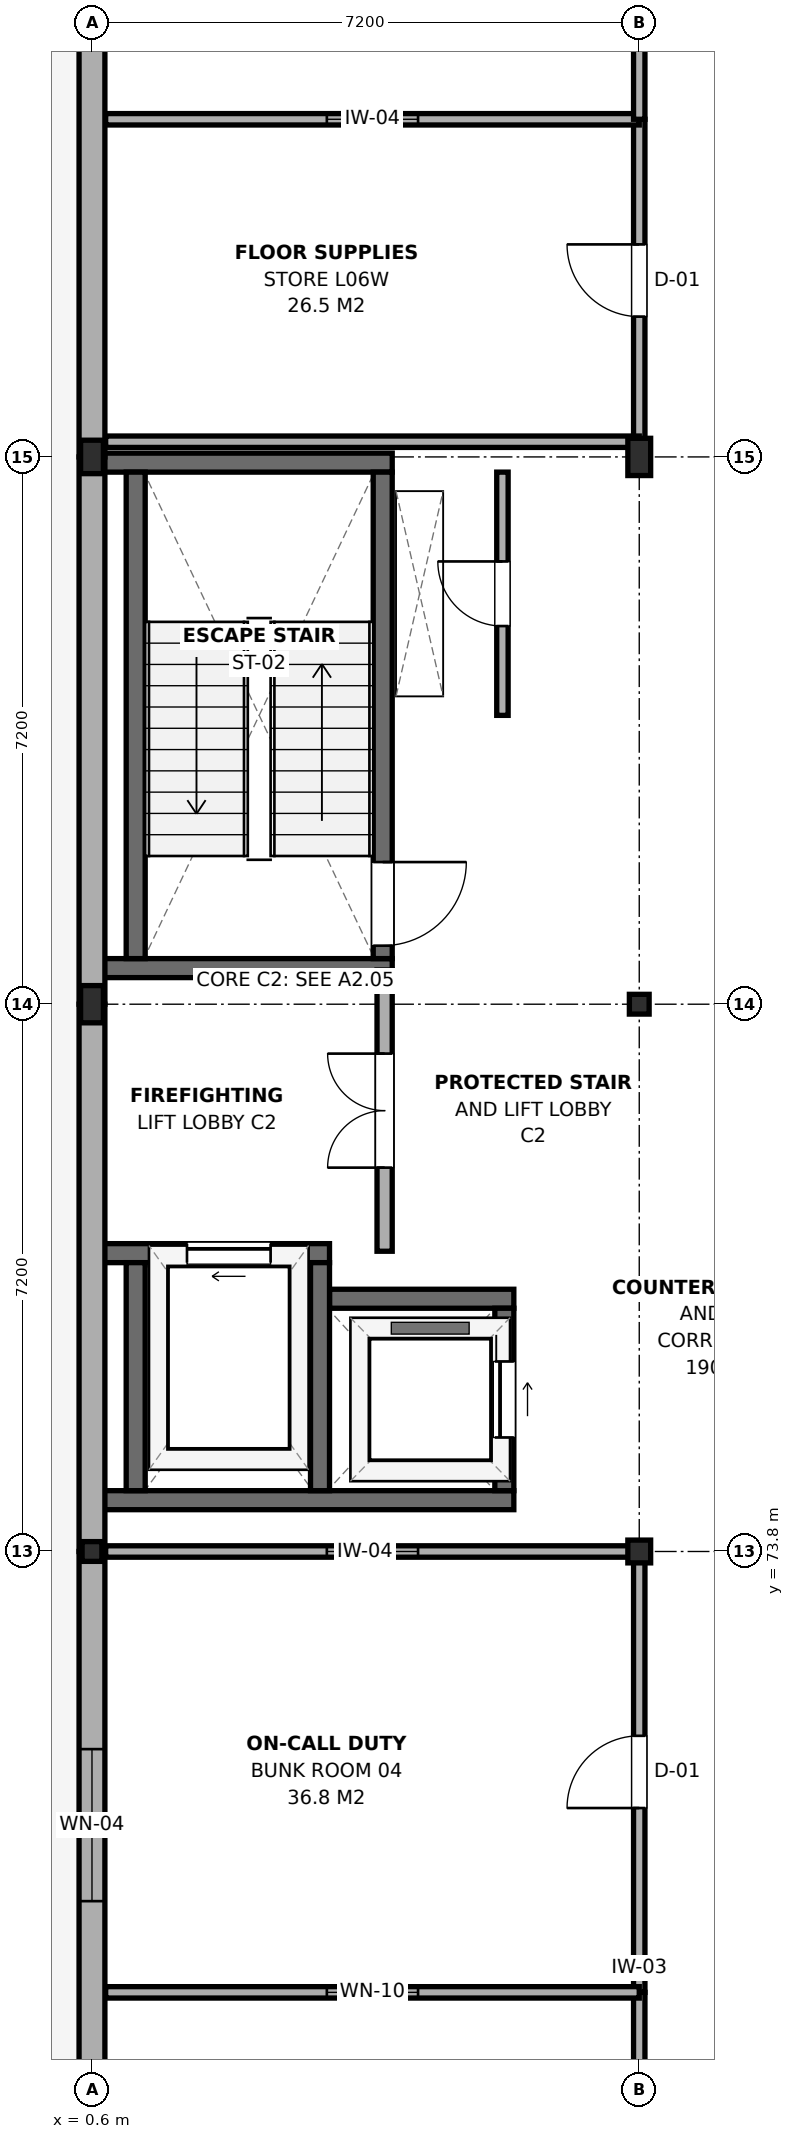
"""IFC4 building model, lengths in metres.
Left out: names, types, materials, properties, quantities, classifications, styles, units other than length and angle.
Written with IfcOpenShell. Run it as: python <this file> out.ifc"""

import sys

from ifc_helpers import new_model, si_unit, direction, frame, frame_2d, origin, origin_2d, place, context, subcontext, project, spatial, rectangle, i_section, extrude, element, fill, save


model = new_model("IFC4")
c1 = context("Model", 3, precision=1e-05, world=origin(), true_north=direction((0.0, 1.0)))
c2 = subcontext(c1, "Body", "Model", "MODEL_VIEW")
j1 = project(units=[si_unit("LENGTHUNIT", "METRE"), si_unit("PLANEANGLEUNIT", "RADIAN")], contexts=[c1])
p1 = place(None, origin())
s1 = spatial("IfcSite", under=j1, at=p1, CompositionType="ELEMENT")
p2 = place(p1, origin())
s2 = spatial("IfcBuilding", under=s1, at=p2, CompositionType="ELEMENT")
p3 = place(p2, frame((0.0, 0.0, 24.9)))
s3 = spatial("IfcBuildingStorey", under=s2, at=p3, CompositionType="ELEMENT", Elevation=24.9)
p4 = place(p3, frame((0.6, 73.8, 0.0), z_axis=(0.0, 0.0, 1.0), x_axis=(1.0, 0.0, 0.0)))
e1 = element("IfcColumn", 1, at=p4, inside=s3, PredefinedType="COLUMN", context=c2, shape_type="SweptSolid", body=[
    extrude(i_section(OverallWidth=0.26, OverallDepth=0.26, WebThickness=0.01, FlangeThickness=0.018, FilletRadius=0.024, at=origin_2d()), origin(), (0.0, 0.0, 1.0), 3.9),
])
p5 = place(p3, frame((0.6, 81.0, 0.0), z_axis=(0.0, 0.0, 1.0), x_axis=(1.0, 0.0, 0.0)))
e2 = element("IfcColumn", 2, at=p5, inside=s3, PredefinedType="COLUMN", context=c2, shape_type="SweptSolid", body=[
    extrude(i_section(OverallWidth=0.3, OverallDepth=0.49, WebThickness=0.012, FlangeThickness=0.023, FilletRadius=0.027, at=origin_2d()), origin(), (0.0, 0.0, 1.0), 3.9),
])
p6 = place(p3, frame((0.6, 88.2, 0.0), z_axis=(0.0, 0.0, 1.0), x_axis=(1.0, 0.0, 0.0)))
e3 = element("IfcColumn", 3, at=p6, inside=s3, PredefinedType="COLUMN", context=c2, shape_type="SweptSolid", body=[
    extrude(i_section(OverallWidth=0.3, OverallDepth=0.44, WebThickness=0.011, FlangeThickness=0.021, FilletRadius=0.027, at=origin_2d()), origin(), (0.0, 0.0, 1.0), 3.9),
])
p7 = place(p3, frame((7.8, 73.8, 0.0), z_axis=(0.0, 0.0, 1.0), x_axis=(1.0, 0.0, 0.0)))
e4 = element("IfcColumn", 4, at=p7, inside=s3, PredefinedType="COLUMN", context=c2, shape_type="SweptSolid", body=[
    extrude(i_section(OverallWidth=0.3, OverallDepth=0.3, WebThickness=0.011, FlangeThickness=0.019, FilletRadius=0.027, at=origin_2d()), origin(), (0.0, 0.0, 1.0), 3.9),
])
p8 = place(p3, frame((7.8, 81.0, 0.0), z_axis=(0.0, 0.0, 1.0), x_axis=(1.0, 0.0, 0.0)))
e5 = element("IfcColumn", 5, at=p8, inside=s3, PredefinedType="COLUMN", context=c2, shape_type="SweptSolid", body=[
    extrude(i_section(OverallWidth=0.26, OverallDepth=0.26, WebThickness=0.01, FlangeThickness=0.018, FilletRadius=0.024, at=origin_2d()), origin(), (0.0, 0.0, 1.0), 3.9),
])
p9 = place(p3, frame((7.8, 88.2, 0.0), z_axis=(0.0, 0.0, 1.0), x_axis=(1.0, 0.0, 0.0)))
e6 = element("IfcColumn", 6, at=p9, inside=s3, PredefinedType="COLUMN", context=c2, shape_type="SweptSolid", body=[
    extrude(i_section(OverallWidth=0.3, OverallDepth=0.49, WebThickness=0.012, FlangeThickness=0.023, FilletRadius=0.027, at=origin_2d()), origin(), (0.0, 0.0, 1.0), 3.9),
])
for number, where, z_axis, x_axis in (
    (7, (0.75, 81.475, 0.0), (0.0, 0.0, 1.0), (1.0, 0.0, 0.0)),
    (8, (0.75, 88.125, 0.0), (0.0, 0.0, 1.0), (1.0, 0.0, 0.0)),
):
    element("IfcWall", number, at=place(p3, frame(where, z_axis=z_axis, x_axis=x_axis)), inside=s3, PredefinedType="SHEAR", context=c2, shape_type="SweptSolid", body=[
        extrude(rectangle(XDim=3.8, YDim=0.25, at=frame_2d((1.9, 0.0))), origin(), (0.0, 0.0, 1.0), 3.72),
    ])
p10 = place(p3, frame((1.175, 81.6, 0.0), z_axis=(0.0, 0.0, 1.0), x_axis=(0.0, 1.0, 0.0)))
e9 = element("IfcWall", 9, at=p10, inside=s3, PredefinedType="SHEAR", context=c2, shape_type="SweptSolid", body=[
    extrude(rectangle(XDim=6.4, YDim=0.25, at=frame_2d((3.2, 0.0))), origin(), (0.0, 0.0, 1.0), 3.72),
])
p11 = place(p3, frame((4.425, 81.6, 0.0), z_axis=(0.0, 0.0, 1.0), x_axis=(0.0, 1.0, 0.0)))
e10 = element("IfcWall", 10, at=p11, inside=s3, PredefinedType="SHEAR", context=c2, shape_type="SweptSolid", body=[
    extrude(rectangle(XDim=6.4, YDim=0.25, at=frame_2d((3.2, 0.0))), origin(), (0.0, 0.0, 1.0), 3.72),
])
p12 = place(p11, frame((0.17, 0.0, 0.0)))
e11 = element("IfcOpeningElement", 11, at=p12, cuts=e10, PredefinedType="OPENING", context=c2, shape_type="SweptSolid", body=[
    extrude(rectangle(XDim=1.1, YDim=2.15, at=frame_2d((0.55, 1.075))), frame((0.0, 0.14, 0.0), z_axis=(0.0, -1.0, 0.0), x_axis=(1.0, 0.0, 0.0)), (0.0, 0.0, 1.0), 0.28),
])
p13 = place(p3, frame((0.75, 74.475, 0.0), z_axis=(0.0, 0.0, 1.0), x_axis=(1.0, 0.0, 0.0)))
e12 = element("IfcWall", 12, at=p13, inside=s3, PredefinedType="SHEAR", context=c2, shape_type="SweptSolid", body=[
    extrude(rectangle(XDim=5.4, YDim=0.25, at=frame_2d((2.7, 0.0))), origin(), (0.0, 0.0, 1.0), 3.72),
])
p14 = place(p3, frame((0.75, 77.725, 0.0), z_axis=(0.0, 0.0, 1.0), x_axis=(1.0, 0.0, 0.0)))
e13 = element("IfcWall", 13, at=p14, inside=s3, PredefinedType="SHEAR", context=c2, shape_type="SweptSolid", body=[
    extrude(rectangle(XDim=2.975, YDim=0.25, at=frame_2d((1.488, 0.0))), origin(), (0.0, 0.0, 1.0), 3.72),
])
p15 = place(p14, frame((1.1, 0.0, 0.0)))
e14 = element("IfcOpeningElement", 14, at=p15, cuts=e13, PredefinedType="OPENING", context=c2, shape_type="SweptSolid", body=[
    extrude(rectangle(XDim=1.1, YDim=2.15, at=frame_2d((0.55, 1.075))), frame((0.0, 0.14, 0.0), z_axis=(0.0, -1.0, 0.0), x_axis=(1.0, 0.0, 0.0)), (0.0, 0.0, 1.0), 0.28),
])
p16 = place(p3, frame((3.725, 77.125, 0.0), z_axis=(0.0, 0.0, 1.0), x_axis=(1.0, 0.0, 0.0)))
e15 = element("IfcWall", 15, at=p16, inside=s3, PredefinedType="SHEAR", context=c2, shape_type="SweptSolid", body=[
    extrude(rectangle(XDim=2.425, YDim=0.25, at=frame_2d((1.212, 0.0))), origin(), (0.0, 0.0, 1.0), 3.72),
])
for number, where, z_axis, x_axis in (
    (16, (1.175, 74.6, 0.0), (0.0, 0.0, 1.0), (0.0, 1.0, 0.0)),
    (17, (3.6, 74.6, 0.0), (0.0, 0.0, 1.0), (0.0, 1.0, 0.0)),
):
    element("IfcWall", number, at=place(p3, frame(where, z_axis=z_axis, x_axis=x_axis)), inside=s3, PredefinedType="SHEAR", context=c2, shape_type="SweptSolid", body=[
        extrude(rectangle(XDim=3.0, YDim=0.25, at=frame_2d((1.5, 0.0))), origin(), (0.0, 0.0, 1.0), 3.72),
    ])
p17 = place(p3, frame((6.025, 74.6, 0.0), z_axis=(0.0, 0.0, 1.0), x_axis=(0.0, 1.0, 0.0)))
e18 = element("IfcWall", 18, at=p17, inside=s3, PredefinedType="SHEAR", context=c2, shape_type="SweptSolid", body=[
    extrude(rectangle(XDim=2.4, YDim=0.25, at=frame_2d((1.2, 0.0))), origin(), (0.0, 0.0, 1.0), 3.72),
])
p18 = place(p17, frame((0.7, 0.0, 0.0)))
e19 = element("IfcOpeningElement", 19, at=p18, cuts=e18, PredefinedType="OPENING", context=c2, shape_type="SweptSolid", body=[
    extrude(rectangle(XDim=1.0, YDim=2.15, at=frame_2d((0.5, 1.075))), frame((0.0, 0.14, 0.0), z_axis=(0.0, -1.0, 0.0), x_axis=(1.0, 0.0, 0.0)), (0.0, 0.0, 1.0), 0.28),
])
p19 = place(p3, frame((0.6, 66.6, 0.0), z_axis=(0.0, 0.0, 1.0), x_axis=(0.0, 1.0, 0.0)))
e20 = element("IfcWall", 20, at=p19, inside=s3, PredefinedType="SOLIDWALL", context=c2, shape_type="SweptSolid", body=[
    extrude(rectangle(XDim=7.2, YDim=0.34, at=frame_2d((3.6, 0.0))), origin(), (0.0, 0.0, 1.0), 3.165),
])
p20 = place(p19, frame((2.6, 0.0, 0.9)))
e21 = element("IfcOpeningElement", 21, at=p20, cuts=e20, PredefinedType="OPENING", context=c2, shape_type="SweptSolid", body=[
    extrude(rectangle(XDim=2.0, YDim=1.8, at=frame_2d((1.0, 0.9))), frame((0.0, 0.185, 0.0), z_axis=(0.0, -1.0, 0.0), x_axis=(1.0, 0.0, 0.0)), (0.0, 0.0, 1.0), 0.37),
])
p21 = place(p3, frame((0.6, 73.8, 0.0), z_axis=(0.0, 0.0, 1.0), x_axis=(0.0, 1.0, 0.0)))
e22 = element("IfcWall", 22, at=p21, inside=s3, PredefinedType="SOLIDWALL", context=c2, shape_type="SweptSolid", body=[
    extrude(rectangle(XDim=7.2, YDim=0.34, at=frame_2d((3.6, 0.0))), origin(), (0.0, 0.0, 1.0), 3.215),
])
p22 = place(p3, frame((0.6, 81.0, 0.0), z_axis=(0.0, 0.0, 1.0), x_axis=(0.0, 1.0, 0.0)))
e23 = element("IfcWall", 23, at=p22, inside=s3, PredefinedType="SOLIDWALL", context=c2, shape_type="SweptSolid", body=[
    extrude(rectangle(XDim=7.2, YDim=0.34, at=frame_2d((3.6, 0.0))), origin(), (0.0, 0.0, 1.0), 3.265),
])
p23 = place(p3, frame((0.6, 88.2, 0.0), z_axis=(0.0, 0.0, 1.0), x_axis=(0.0, 1.0, 0.0)))
e24 = element("IfcWall", 24, at=p23, inside=s3, PredefinedType="SOLIDWALL", context=c2, shape_type="SweptSolid", body=[
    extrude(rectangle(XDim=7.8, YDim=0.34, at=frame_2d((3.9, 0.0))), origin(), (0.0, 0.0, 1.0), 3.225),
])
p24 = place(p3, frame((4.45, 77.75, 0.0), z_axis=(0.0, 0.0, 1.0), x_axis=(0.0, 1.0, 0.0)))
e25 = element("IfcWall", 25, at=p24, inside=s3, PredefinedType="PARTITIONING", context=c2, shape_type="SweptSolid", body=[
    extrude(rectangle(XDim=3.7, YDim=0.2, at=frame_2d((1.85, 0.0))), origin(), (0.0, 0.0, 1.0), 3.115),
])
p25 = place(p24, frame((1.1, 0.0, 0.0)))
e26 = element("IfcOpeningElement", 26, at=p25, cuts=e25, PredefinedType="OPENING", context=c2, shape_type="SweptSolid", body=[
    extrude(rectangle(XDim=1.5, YDim=2.15, at=frame_2d((0.75, 1.075))), frame((0.0, 0.115, 0.0), z_axis=(0.0, -1.0, 0.0), x_axis=(1.0, 0.0, 0.0)), (0.0, 0.0, 1.0), 0.23),
])
p26 = place(p3, frame((6.0, 84.8, 0.0), z_axis=(0.0, 0.0, 1.0), x_axis=(0.0, 1.0, 0.0)))
e27 = element("IfcWall", 27, at=p26, inside=s3, PredefinedType="PARTITIONING", context=c2, shape_type="SweptSolid", body=[
    extrude(rectangle(XDim=3.2, YDim=0.15, at=frame_2d((1.6, 0.0))), origin(), (0.0, 0.0, 1.0), 3.265),
])
p27 = place(p26, frame((1.175, 0.0, 0.0)))
e28 = element("IfcOpeningElement", 28, at=p27, cuts=e27, PredefinedType="OPENING", context=c2, shape_type="SweptSolid", body=[
    extrude(rectangle(XDim=0.85, YDim=2.1, at=frame_2d((0.425, 1.05))), frame((0.0, 0.09, 0.0), z_axis=(0.0, -1.0, 0.0), x_axis=(1.0, 0.0, 0.0)), (0.0, 0.0, 1.0), 0.18),
])
p28 = place(p3, frame((7.8, 62.0, 0.0), z_axis=(0.0, 0.0, 1.0), x_axis=(0.0, 1.0, 0.0)))
e29 = element("IfcWall", 29, at=p28, inside=s3, PredefinedType="PARTITIONING", context=c2, shape_type="SweptSolid", body=[
    extrude(rectangle(XDim=6.0, YDim=0.15, at=frame_2d((3.0, 0.0))), origin(), (0.0, 0.0, 1.0), 3.115),
])
p29 = place(p28, frame((2.525, 0.0, 0.0)))
e30 = element("IfcOpeningElement", 30, at=p29, cuts=e29, PredefinedType="OPENING", context=c2, shape_type="SweptSolid", body=[
    extrude(rectangle(XDim=0.95, YDim=2.15, at=frame_2d((0.475, 1.075))), frame((0.0, 0.09, 0.0), z_axis=(0.0, -1.0, 0.0), x_axis=(1.0, 0.0, 0.0)), (0.0, 0.0, 1.0), 0.18),
])
p30 = place(p3, frame((7.8, 68.0, 0.0), z_axis=(0.0, 0.0, 1.0), x_axis=(0.0, 1.0, 0.0)))
e31 = element("IfcWall", 31, at=p30, inside=s3, PredefinedType="PARTITIONING", context=c2, shape_type="SweptSolid", body=[
    extrude(rectangle(XDim=5.8, YDim=0.15, at=frame_2d((2.9, 0.0))), origin(), (0.0, 0.0, 1.0), 3.265),
])
p31 = place(p30, frame((2.425, 0.0, 0.0)))
e32 = element("IfcOpeningElement", 32, at=p31, cuts=e31, PredefinedType="OPENING", context=c2, shape_type="SweptSolid", body=[
    extrude(rectangle(XDim=0.95, YDim=2.15, at=frame_2d((0.475, 1.075))), frame((0.0, 0.09, 0.0), z_axis=(0.0, -1.0, 0.0), x_axis=(1.0, 0.0, 0.0)), (0.0, 0.0, 1.0), 0.18),
])
p32 = place(p3, frame((0.78, 68.0, 0.0), z_axis=(0.0, 0.0, 1.0), x_axis=(1.0, 0.0, 0.0)))
e33 = element("IfcWall", 33, at=p32, inside=s3, PredefinedType="PARTITIONING", context=c2, shape_type="SweptSolid", body=[
    extrude(rectangle(XDim=7.02, YDim=0.15, at=frame_2d((3.51, 0.0))), origin(), (0.0, 0.0, 1.0), 3.215),
])
p33 = place(p32, frame((2.91, 0.0, 0.95)))
e34 = element("IfcOpeningElement", 34, at=p33, cuts=e33, PredefinedType="OPENING", context=c2, shape_type="SweptSolid", body=[
    extrude(rectangle(XDim=1.2, YDim=1.5, at=frame_2d((0.6, 0.75))), frame((0.0, 0.09, 0.0), z_axis=(0.0, -1.0, 0.0), x_axis=(1.0, 0.0, 0.0)), (0.0, 0.0, 1.0), 0.18),
])
p34 = place(p3, frame((0.78, 73.8, 0.0), z_axis=(0.0, 0.0, 1.0), x_axis=(1.0, 0.0, 0.0)))
e35 = element("IfcWall", 35, at=p34, inside=s3, PredefinedType="PARTITIONING", context=c2, shape_type="SweptSolid", body=[
    extrude(rectangle(XDim=7.02, YDim=0.15, at=frame_2d((3.51, 0.0))), origin(), (0.0, 0.0, 1.0), 3.215),
])
p35 = place(p34, frame((2.91, 0.0, 0.95)))
e36 = element("IfcOpeningElement", 36, at=p35, cuts=e35, PredefinedType="OPENING", context=c2, shape_type="SweptSolid", body=[
    extrude(rectangle(XDim=1.2, YDim=1.5, at=frame_2d((0.6, 0.75))), frame((0.0, 0.09, 0.0), z_axis=(0.0, -1.0, 0.0), x_axis=(1.0, 0.0, 0.0)), (0.0, 0.0, 1.0), 0.18),
])
p36 = place(p3, frame((7.8, 88.4, 0.0), z_axis=(0.0, 0.0, 1.0), x_axis=(0.0, 1.0, 0.0)))
e37 = element("IfcWall", 37, at=p36, inside=s3, PredefinedType="PARTITIONING", context=c2, shape_type="SweptSolid", body=[
    extrude(rectangle(XDim=4.242, YDim=0.15, at=frame_2d((2.121, 0.0))), origin(), (0.0, 0.0, 1.0), 3.115),
])
p37 = place(p36, frame((1.646, 0.0, 0.0)))
e38 = element("IfcOpeningElement", 38, at=p37, cuts=e37, PredefinedType="OPENING", context=c2, shape_type="SweptSolid", body=[
    extrude(rectangle(XDim=0.95, YDim=2.15, at=frame_2d((0.475, 1.075))), frame((0.0, 0.09, 0.0), z_axis=(0.0, -1.0, 0.0), x_axis=(1.0, 0.0, 0.0)), (0.0, 0.0, 1.0), 0.18),
])
p38 = place(p3, frame((0.78, 92.642, 0.0), z_axis=(0.0, 0.0, 1.0), x_axis=(1.0, 0.0, 0.0)))
e39 = element("IfcWall", 39, at=p38, inside=s3, PredefinedType="PARTITIONING", context=c2, shape_type="SweptSolid", body=[
    extrude(rectangle(XDim=7.02, YDim=0.15, at=frame_2d((3.51, 0.0))), origin(), (0.0, 0.0, 1.0), 3.115),
])
p39 = place(p38, frame((2.91, 0.0, 0.95)))
e40 = element("IfcOpeningElement", 40, at=p39, cuts=e39, PredefinedType="OPENING", context=c2, shape_type="SweptSolid", body=[
    extrude(rectangle(XDim=1.2, YDim=1.5, at=frame_2d((0.6, 0.75))), frame((0.0, 0.09, 0.0), z_axis=(0.0, -1.0, 0.0), x_axis=(1.0, 0.0, 0.0)), (0.0, 0.0, 1.0), 0.18),
])
p40 = place(p3, frame((7.8, 92.642, 0.0), z_axis=(0.0, 0.0, 1.0), x_axis=(0.0, 1.0, 0.0)))
e41 = element("IfcWall", 41, at=p40, inside=s3, PredefinedType="PARTITIONING", context=c2, shape_type="SweptSolid", body=[
    extrude(rectangle(XDim=3.358, YDim=0.15, at=frame_2d((1.679, 0.0))), origin(), (0.0, 0.0, 1.0), 3.115),
])
p41 = place(p40, frame((1.229, 0.0, 0.0)))
e42 = element("IfcOpeningElement", 42, at=p41, cuts=e41, PredefinedType="OPENING", context=c2, shape_type="SweptSolid", body=[
    extrude(rectangle(XDim=0.9, YDim=2.15, at=frame_2d((0.45, 1.075))), frame((0.0, 0.09, 0.0), z_axis=(0.0, -1.0, 0.0), x_axis=(1.0, 0.0, 0.0)), (0.0, 0.0, 1.0), 0.18),
])
p42 = place(p3, frame((0.78, 88.4, 0.0), z_axis=(0.0, 0.0, 1.0), x_axis=(1.0, 0.0, 0.0)))
e43 = element("IfcWall", 43, at=p42, inside=s3, PredefinedType="PARTITIONING", context=c2, shape_type="SweptSolid", body=[
    extrude(rectangle(XDim=7.02, YDim=0.15, at=frame_2d((3.51, 0.0))), origin(), (0.0, 0.0, 1.0), 3.115),
])
p43 = place(p20, origin())
e44 = element("IfcWindow", 44, at=p43, inside=s3, PartitioningType="SINGLE_PANEL", PredefinedType="WINDOW", context=c2, shape_type="SweptSolid", body=[
    extrude(rectangle(XDim=2.0, YDim=1.8, at=frame_2d((1.0, 0.9))), frame((0.0, 0.03, 0.0), z_axis=(0.0, -1.0, 0.0), x_axis=(1.0, 0.0, 0.0)), (0.0, 0.0, 1.0), 0.06),
])
fill(e21, e44)
p44 = place(p12, frame((1.1, 0.0, 0.0), z_axis=(0.0, 0.0, 1.0), x_axis=(-1.0, 0.0, 0.0)))
e45 = element("IfcDoor", 45, at=p44, inside=s3, OperationType="SINGLE_SWING_LEFT", PredefinedType="DOOR", context=c2, shape_type="SweptSolid", body=[
    extrude(rectangle(XDim=1.1, YDim=2.15, at=frame_2d((0.55, 1.075))), frame((0.0, 0.025, 0.0), z_axis=(0.0, -1.0, 0.0), x_axis=(1.0, 0.0, 0.0)), (0.0, 0.0, 1.0), 0.05),
])
fill(e11, e45)
p45 = place(p15, origin())
e46 = element("IfcDoor", 46, at=p45, inside=s3, OperationType="SLIDING_TO_LEFT", PredefinedType="DOOR", context=c2, shape_type="SweptSolid", body=[
    extrude(rectangle(XDim=1.1, YDim=2.15, at=frame_2d((0.55, 1.075))), frame((0.0, 0.025, 0.0), z_axis=(0.0, -1.0, 0.0), x_axis=(1.0, 0.0, 0.0)), (0.0, 0.0, 1.0), 0.05),
])
fill(e14, e46)
p46 = place(p18, frame((1.0, 0.0, 0.0), z_axis=(0.0, 0.0, 1.0), x_axis=(-1.0, 0.0, 0.0)))
e47 = element("IfcDoor", 47, at=p46, inside=s3, OperationType="SLIDING_TO_RIGHT", PredefinedType="DOOR", context=c2, shape_type="SweptSolid", body=[
    extrude(rectangle(XDim=1.0, YDim=2.15, at=frame_2d((0.5, 1.075))), frame((0.0, 0.025, 0.0), z_axis=(0.0, -1.0, 0.0), x_axis=(1.0, 0.0, 0.0)), (0.0, 0.0, 1.0), 0.05),
])
fill(e19, e47)
p47 = place(p25, origin())
e48 = element("IfcDoor", 48, at=p47, inside=s3, OperationType="DOUBLE_DOOR_SINGLE_SWING", PredefinedType="DOOR", context=c2, shape_type="SweptSolid", body=[
    extrude(rectangle(XDim=1.5, YDim=2.15, at=frame_2d((0.75, 1.075))), frame((0.0, 0.025, 0.0), z_axis=(0.0, -1.0, 0.0), x_axis=(1.0, 0.0, 0.0)), (0.0, 0.0, 1.0), 0.05),
])
fill(e26, e48)
p48 = place(p27, origin())
e49 = element("IfcDoor", 49, at=p48, inside=s3, OperationType="SINGLE_SWING_RIGHT", PredefinedType="DOOR", context=c2, shape_type="SweptSolid", body=[
    extrude(rectangle(XDim=0.85, YDim=2.1, at=frame_2d((0.425, 1.05))), frame((0.0, 0.025, 0.0), z_axis=(0.0, -1.0, 0.0), x_axis=(1.0, 0.0, 0.0)), (0.0, 0.0, 1.0), 0.05),
])
fill(e28, e49)
p49 = place(p31, origin())
e50 = element("IfcDoor", 50, at=p49, inside=s3, OperationType="SINGLE_SWING_LEFT", PredefinedType="DOOR", context=c2, shape_type="SweptSolid", body=[
    extrude(rectangle(XDim=0.95, YDim=2.15, at=frame_2d((0.475, 1.075))), frame((0.0, 0.025, 0.0), z_axis=(0.0, -1.0, 0.0), x_axis=(1.0, 0.0, 0.0)), (0.0, 0.0, 1.0), 0.05),
])
fill(e32, e50)
p50 = place(p33, origin())
e51 = element("IfcWindow", 51, at=p50, inside=s3, PartitioningType="SINGLE_PANEL", PredefinedType="WINDOW", context=c2, shape_type="SweptSolid", body=[
    extrude(rectangle(XDim=1.2, YDim=1.5, at=frame_2d((0.6, 0.75))), frame((0.0, 0.03, 0.0), z_axis=(0.0, -1.0, 0.0), x_axis=(1.0, 0.0, 0.0)), (0.0, 0.0, 1.0), 0.06),
])
fill(e34, e51)
p51 = place(p35, origin())
e52 = element("IfcWindow", 52, at=p51, inside=s3, PartitioningType="SINGLE_PANEL", PredefinedType="WINDOW", context=c2, shape_type="SweptSolid", body=[
    extrude(rectangle(XDim=1.2, YDim=1.5, at=frame_2d((0.6, 0.75))), frame((0.0, 0.03, 0.0), z_axis=(0.0, -1.0, 0.0), x_axis=(1.0, 0.0, 0.0)), (0.0, 0.0, 1.0), 0.06),
])
fill(e36, e52)
p52 = place(p37, origin())
e53 = element("IfcDoor", 53, at=p52, inside=s3, OperationType="SINGLE_SWING_RIGHT", PredefinedType="DOOR", context=c2, shape_type="SweptSolid", body=[
    extrude(rectangle(XDim=0.95, YDim=2.15, at=frame_2d((0.475, 1.075))), frame((0.0, 0.025, 0.0), z_axis=(0.0, -1.0, 0.0), x_axis=(1.0, 0.0, 0.0)), (0.0, 0.0, 1.0), 0.05),
])
fill(e38, e53)
p53 = place(p39, origin())
e54 = element("IfcWindow", 54, at=p53, inside=s3, PartitioningType="SINGLE_PANEL", PredefinedType="WINDOW", context=c2, shape_type="SweptSolid", body=[
    extrude(rectangle(XDim=1.2, YDim=1.5, at=frame_2d((0.6, 0.75))), frame((0.0, 0.03, 0.0), z_axis=(0.0, -1.0, 0.0), x_axis=(1.0, 0.0, 0.0)), (0.0, 0.0, 1.0), 0.06),
])
fill(e40, e54)
save(model, sys.argv[1])
